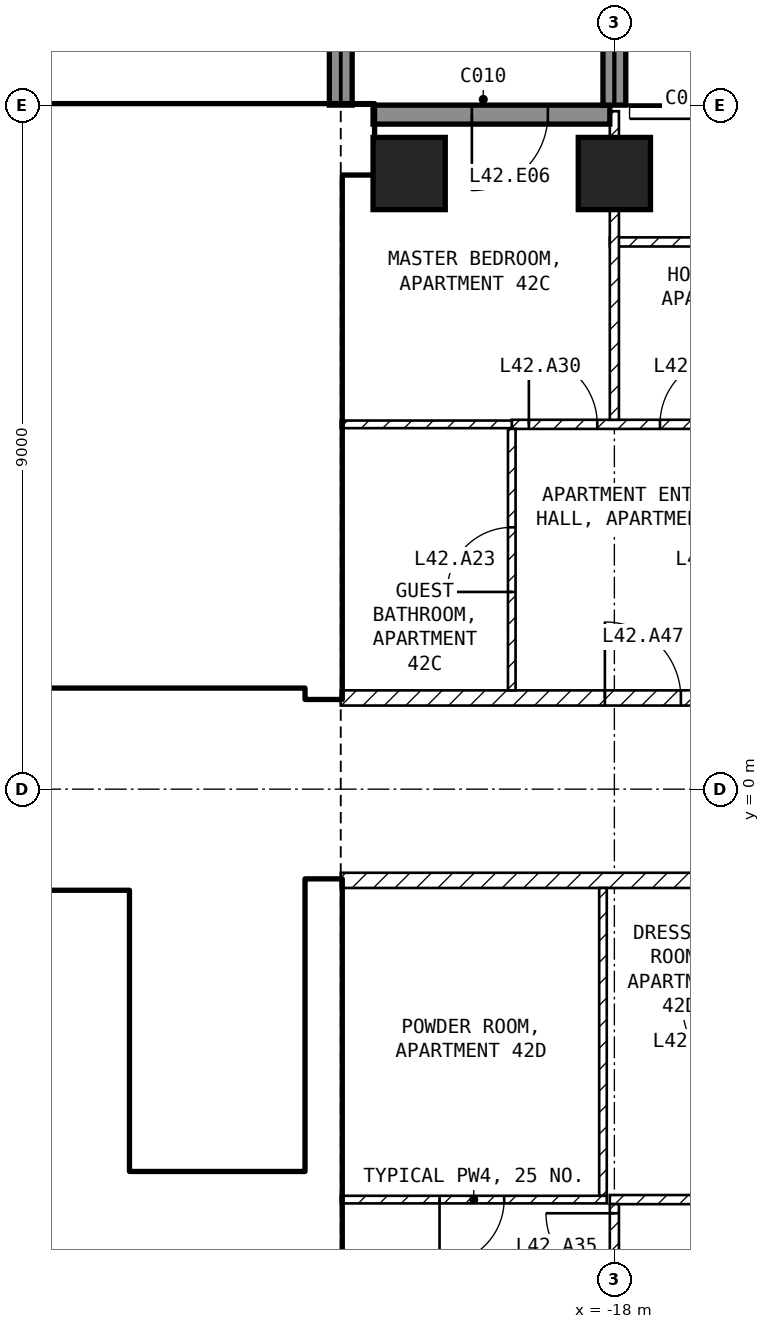
"""IFC4 building model, lengths in metres.
Left out: names, types, materials, properties, quantities, classifications, styles, units other than length and angle.
Written with IfcOpenShell. Run it as: python <this file> out.ifc"""

import sys

from ifc_helpers import new_model, si_unit, direction, frame, frame_2d, origin, origin_2d, place, context, subcontext, project, spatial, rectangle, extrude, element, fill, save


model = new_model("IFC4")
c1 = context("Model", 3, precision=1e-05, world=origin(), true_north=direction((0.0, 1.0)))
c2 = subcontext(c1, "Body", "Model", "MODEL_VIEW")
j1 = project(units=[si_unit("LENGTHUNIT", "METRE"), si_unit("PLANEANGLEUNIT", "RADIAN")], contexts=[c1])
p1 = place(None, origin())
s1 = spatial("IfcSite", under=j1, at=p1, CompositionType="ELEMENT")
p2 = place(p1, origin())
s2 = spatial("IfcBuilding", under=s1, at=p2, CompositionType="ELEMENT")
p3 = place(p2, frame((0.0, 0.0, 173.6)))
s3 = spatial("IfcBuildingStorey", under=s2, at=p3, CompositionType="ELEMENT", Elevation=173.6)
for number, where, z_axis, x_axis in (
    (1, (-20.7, 8.1, -0.25), (0.0, 0.0, 1.0), (1.0, 0.0, 0.0)),
    (2, (-18.0, 8.1, -0.25), (0.0, 0.0, 1.0), (1.0, 0.0, 0.0)),
):
    element("IfcColumn", number, at=place(p3, frame(where, z_axis=z_axis, x_axis=x_axis)), inside=s3, PredefinedType="COLUMN", context=c2, shape_type="SweptSolid", body=[
        extrude(rectangle(XDim=0.95, YDim=0.95, at=origin_2d()), origin(), (0.0, 0.0, 1.0), 3.5),
    ])
p4 = place(p3, frame((-18.06, 8.875, 0.0), z_axis=(0.0, 0.0, 1.0), x_axis=(-1.0, 0.0, 0.0)))
e3 = element("IfcWall", 3, at=p4, inside=s3, PredefinedType="SOLIDWALL", context=c2, shape_type="SweptSolid", body=[
    extrude(rectangle(XDim=3.115, YDim=0.25, at=frame_2d((1.558, 0.0))), origin(), (0.0, 0.0, 1.0), 3.25),
])
p5 = place(p4, frame((0.815, 0.0, 0.0)))
e4 = element("IfcOpeningElement", 4, at=p5, cuts=e3, PredefinedType="OPENING", context=c2, shape_type="SweptSolid", body=[
    extrude(rectangle(XDim=1.0, YDim=2.4, at=frame_2d((0.5, 1.2))), frame((0.0, 0.135, 0.0), z_axis=(0.0, -1.0, 0.0), x_axis=(1.0, 0.0, 0.0)), (0.0, 0.0, 1.0), 0.27),
])
for number, where, z_axis, x_axis in (
    (5, (-21.6, 9.0, 0.0), (0.0, 0.0, 1.0), (0.0, 1.0, 0.0)),
    (6, (-18.0, 9.0, 0.0), (0.0, 0.0, 1.0), (0.0, 1.0, 0.0)),
):
    element("IfcWall", number, at=place(p3, frame(where, z_axis=z_axis, x_axis=x_axis)), inside=s3, PredefinedType="SOLIDWALL", context=c2, shape_type="SweptSolid", body=[
        extrude(rectangle(XDim=2.7, YDim=0.3, at=frame_2d((1.35, 0.0))), origin(), (0.0, 0.0, 1.0), 3.25),
    ])
p6 = place(p3, frame((-29.6, 8.55, 0.0), z_axis=(0.0, 0.0, 1.0), x_axis=(1.0, 0.0, 0.0)))
e7 = element("IfcWall", 7, at=p6, inside=s3, PredefinedType="SHEAR", context=c2, shape_type="SweptSolid", body=[
    extrude(rectangle(XDim=8.425, YDim=0.9, at=frame_2d((4.212, 0.0))), origin(), (0.0, 0.0, 1.0), 3.25),
])
for number, where, z_axis, x_axis in (
    (8, (-21.825, -8.1, 0.0), (0.0, 0.0, 1.0), (0.0, 1.0, 0.0)),
    (9, (-21.825, 1.2, 0.0), (0.0, 0.0, 1.0), (0.0, 1.0, 0.0)),
):
    element("IfcWall", number, at=place(p3, frame(where, z_axis=z_axis, x_axis=x_axis)), inside=s3, PredefinedType="SHEAR", context=c2, shape_type="SweptSolid", body=[
        extrude(rectangle(XDim=6.9, YDim=0.45, at=frame_2d((3.45, 0.0))), origin(), (0.0, 0.0, 1.0), 3.25),
    ])
p7 = place(p3, frame((-33.2, 1.45, 0.0), z_axis=(0.0, 0.0, 1.0), x_axis=(1.0, 0.0, 0.0)))
e10 = element("IfcWall", 10, at=p7, inside=s3, PredefinedType="SOLIDWALL", context=c2, shape_type="SweptSolid", body=[
    extrude(rectangle(XDim=11.15, YDim=0.2, at=frame_2d((5.575, 0.0))), origin(), (0.0, 0.0, 1.0), 3.25),
])
p8 = place(p7, frame((9.4, 0.0, 0.0)))
e11 = element("IfcOpeningElement", 11, at=p8, cuts=e10, PredefinedType="OPENING", context=c2, shape_type="SweptSolid", body=[
    extrude(rectangle(XDim=1.0, YDim=2.1, at=frame_2d((0.5, 1.05))), frame((0.0, 0.11, 0.0), z_axis=(0.0, -1.0, 0.0), x_axis=(1.0, 0.0, 0.0)), (0.0, 0.0, 1.0), 0.22),
])
p9 = place(p7, frame((6.9, 0.0, 0.0)))
e12 = element("IfcOpeningElement", 12, at=p9, cuts=e10, PredefinedType="OPENING", context=c2, shape_type="SweptSolid", body=[
    extrude(rectangle(XDim=1.0, YDim=2.1, at=frame_2d((0.5, 1.05))), frame((0.0, 0.11, 0.0), z_axis=(0.0, -1.0, 0.0), x_axis=(1.0, 0.0, 0.0)), (0.0, 0.0, 1.0), 0.22),
])
p10 = place(p7, frame((1.1, 0.0, 0.0)))
e13 = element("IfcOpeningElement", 13, at=p10, cuts=e10, PredefinedType="OPENING", context=c2, shape_type="SweptSolid", body=[
    extrude(rectangle(XDim=0.9, YDim=2.1, at=frame_2d((0.45, 1.05))), frame((0.0, 0.11, 0.0), z_axis=(0.0, -1.0, 0.0), x_axis=(1.0, 0.0, 0.0)), (0.0, 0.0, 1.0), 0.22),
])
p11 = place(p3, frame((-24.5, -5.05, 0.0), z_axis=(0.0, 0.0, 1.0), x_axis=(0.0, 1.0, 0.0)))
e14 = element("IfcWall", 14, at=p11, inside=s3, PredefinedType="SOLIDWALL", context=c2, shape_type="SweptSolid", body=[
    extrude(rectangle(XDim=3.7, YDim=0.2, at=frame_2d((1.85, 0.0))), origin(), (0.0, 0.0, 1.0), 3.25),
])
p12 = place(p11, frame((0.1, 0.0, 0.0)))
e15 = element("IfcOpeningElement", 15, at=p12, cuts=e14, PredefinedType="OPENING", context=c2, shape_type="SweptSolid", body=[
    extrude(rectangle(XDim=0.8, YDim=2.1, at=frame_2d((0.4, 1.05))), frame((0.0, 0.11, 0.0), z_axis=(0.0, -1.0, 0.0), x_axis=(1.0, 0.0, 0.0)), (0.0, 0.0, 1.0), 0.22),
])
p13 = place(p3, frame((-28.35, 5.15, 0.0), z_axis=(0.0, 0.0, 1.0), x_axis=(1.0, 0.0, 0.0)))
e16 = element("IfcWall", 16, at=p13, inside=s3, PredefinedType="SOLIDWALL", context=c2, shape_type="SweptSolid", body=[
    extrude(rectangle(XDim=6.3, YDim=0.2, at=frame_2d((3.15, 0.0))), origin(), (0.0, 0.0, 1.0), 3.25),
])
p14 = place(p13, frame((5.1, 0.0, 0.0)))
e17 = element("IfcOpeningElement", 17, at=p14, cuts=e16, PredefinedType="OPENING", context=c2, shape_type="SweptSolid", body=[
    extrude(rectangle(XDim=1.0, YDim=2.1, at=frame_2d((0.5, 1.05))), frame((0.0, 0.11, 0.0), z_axis=(0.0, -1.0, 0.0), x_axis=(1.0, 0.0, 0.0)), (0.0, 0.0, 1.0), 0.22),
])
p15 = place(p3, frame((-28.35, -5.15, 0.0), z_axis=(0.0, 0.0, 1.0), x_axis=(1.0, 0.0, 0.0)))
e18 = element("IfcWall", 18, at=p15, inside=s3, PredefinedType="SOLIDWALL", context=c2, shape_type="SweptSolid", body=[
    extrude(rectangle(XDim=6.3, YDim=0.2, at=frame_2d((3.15, 0.0))), origin(), (0.0, 0.0, 1.0), 3.25),
])
p16 = place(p15, frame((5.1, 0.0, 0.0)))
e19 = element("IfcOpeningElement", 19, at=p16, cuts=e18, PredefinedType="OPENING", context=c2, shape_type="SweptSolid", body=[
    extrude(rectangle(XDim=1.0, YDim=2.1, at=frame_2d((0.5, 1.05))), frame((0.0, 0.11, 0.0), z_axis=(0.0, -1.0, 0.0), x_axis=(1.0, 0.0, 0.0)), (0.0, 0.0, 1.0), 0.22),
])
p17 = place(p3, frame((-33.2, -1.45, 0.0), z_axis=(0.0, 0.0, 1.0), x_axis=(1.0, 0.0, 0.0)))
e20 = element("IfcWall", 20, at=p17, inside=s3, PredefinedType="SOLIDWALL", context=c2, shape_type="SweptSolid", body=[
    extrude(rectangle(XDim=8.6, YDim=0.2, at=frame_2d((4.3, 0.0))), origin(), (0.0, 0.0, 1.0), 3.25),
])
p18 = place(p17, frame((7.2, 0.0, 0.0)))
e21 = element("IfcOpeningElement", 21, at=p18, cuts=e20, PredefinedType="OPENING", context=c2, shape_type="SweptSolid", body=[
    extrude(rectangle(XDim=1.0, YDim=2.1, at=frame_2d((0.5, 1.05))), frame((0.0, 0.11, 0.0), z_axis=(0.0, -1.0, 0.0), x_axis=(1.0, 0.0, 0.0)), (0.0, 0.0, 1.0), 0.22),
])
p19 = place(p17, frame((5.2, 0.0, 0.0)))
e22 = element("IfcOpeningElement", 22, at=p19, cuts=e20, PredefinedType="OPENING", context=c2, shape_type="SweptSolid", body=[
    extrude(rectangle(XDim=1.0, YDim=2.1, at=frame_2d((0.5, 1.05))), frame((0.0, 0.11, 0.0), z_axis=(0.0, -1.0, 0.0), x_axis=(1.0, 0.0, 0.0)), (0.0, 0.0, 1.0), 0.22),
])
p20 = place(p17, frame((3.2, 0.0, 0.0)))
e23 = element("IfcOpeningElement", 23, at=p20, cuts=e20, PredefinedType="OPENING", context=c2, shape_type="SweptSolid", body=[
    extrude(rectangle(XDim=1.0, YDim=2.1, at=frame_2d((0.5, 1.05))), frame((0.0, 0.11, 0.0), z_axis=(0.0, -1.0, 0.0), x_axis=(1.0, 0.0, 0.0)), (0.0, 0.0, 1.0), 0.22),
])
p21 = place(p17, frame((0.85, 0.0, 0.0)))
e24 = element("IfcOpeningElement", 24, at=p21, cuts=e20, PredefinedType="OPENING", context=c2, shape_type="SweptSolid", body=[
    extrude(rectangle(XDim=0.9, YDim=2.1, at=frame_2d((0.45, 1.05))), frame((0.0, 0.11, 0.0), z_axis=(0.0, -1.0, 0.0), x_axis=(1.0, 0.0, 0.0)), (0.0, 0.0, 1.0), 0.22),
])
p22 = place(p3, frame((-33.2, -3.95, 0.0), z_axis=(0.0, 0.0, 1.0), x_axis=(1.0, 0.0, 0.0)))
e25 = element("IfcWall", 25, at=p22, inside=s3, PredefinedType="SOLIDWALL", context=c2, shape_type="SweptSolid", body=[
    extrude(rectangle(XDim=8.6, YDim=0.2, at=frame_2d((4.3, 0.0))), origin(), (0.0, 0.0, 1.0), 3.25),
])
p23 = place(p3, frame((-21.6, 1.2, 0.0), z_axis=(0.0, 0.0, 1.0), x_axis=(1.0, 0.0, 0.0)))
e26 = element("IfcWall", 26, at=p23, inside=s3, PredefinedType="PARTITIONING", context=c2, shape_type="SweptSolid", body=[
    extrude(rectangle(XDim=17.2, YDim=0.2, at=frame_2d((8.6, 0.0))), origin(), (0.0, 0.0, 1.0), 3.25),
])
p24 = place(p23, frame((3.475, 0.0, 0.0)))
e27 = element("IfcOpeningElement", 27, at=p24, cuts=e26, PredefinedType="OPENING", context=c2, shape_type="SweptSolid", body=[
    extrude(rectangle(XDim=1.0, YDim=2.1, at=frame_2d((0.5, 1.05))), frame((0.0, 0.11, 0.0), z_axis=(0.0, -1.0, 0.0), x_axis=(1.0, 0.0, 0.0)), (0.0, 0.0, 1.0), 0.22),
])
p25 = place(p3, frame((-4.4, -1.2, 0.0), z_axis=(0.0, 0.0, 1.0), x_axis=(-1.0, 0.0, 0.0)))
e28 = element("IfcWall", 28, at=p25, inside=s3, PredefinedType="PARTITIONING", context=c2, shape_type="SweptSolid", body=[
    extrude(rectangle(XDim=17.2, YDim=0.2, at=frame_2d((8.6, 0.0))), origin(), (0.0, 0.0, 1.0), 3.25),
])
p26 = place(p25, frame((9.95, 0.0, 0.0)))
e29 = element("IfcOpeningElement", 29, at=p26, cuts=e28, PredefinedType="OPENING", context=c2, shape_type="SweptSolid", body=[
    extrude(rectangle(XDim=1.0, YDim=2.1, at=frame_2d((0.5, 1.05))), frame((0.0, 0.11, 0.0), z_axis=(0.0, -1.0, 0.0), x_axis=(1.0, 0.0, 0.0)), (0.0, 0.0, 1.0), 0.22),
])
p27 = place(p3, frame((-19.35, 4.8, 0.0), z_axis=(0.0, 0.0, 1.0), x_axis=(1.0, 0.0, 0.0)))
e30 = element("IfcWall", 30, at=p27, inside=s3, PredefinedType="PARTITIONING", context=c2, shape_type="SweptSolid", body=[
    extrude(rectangle(XDim=10.41, YDim=0.12, at=frame_2d((5.205, 0.0))), origin(), (0.0, 0.0, 1.0), 3.25),
])
p28 = place(p27, frame((1.95, 0.0, 0.0)))
e31 = element("IfcOpeningElement", 31, at=p28, cuts=e30, PredefinedType="OPENING", context=c2, shape_type="SweptSolid", body=[
    extrude(rectangle(XDim=0.9, YDim=2.1, at=frame_2d((0.45, 1.05))), frame((0.0, 0.07, 0.0), z_axis=(0.0, -1.0, 0.0), x_axis=(1.0, 0.0, 0.0)), (0.0, 0.0, 1.0), 0.14),
])
p29 = place(p27, frame((7.8, 0.0, 0.0)))
e32 = element("IfcOpeningElement", 32, at=p29, cuts=e30, PredefinedType="OPENING", context=c2, shape_type="SweptSolid", body=[
    extrude(rectangle(XDim=0.9, YDim=2.1, at=frame_2d((0.45, 1.05))), frame((0.0, 0.07, 0.0), z_axis=(0.0, -1.0, 0.0), x_axis=(1.0, 0.0, 0.0)), (0.0, 0.0, 1.0), 0.14),
])
p30 = place(p27, frame((0.225, 0.0, 0.0)))
e33 = element("IfcOpeningElement", 33, at=p30, cuts=e30, PredefinedType="OPENING", context=c2, shape_type="SweptSolid", body=[
    extrude(rectangle(XDim=0.9, YDim=2.1, at=frame_2d((0.45, 1.05))), frame((0.0, 0.07, 0.0), z_axis=(0.0, -1.0, 0.0), x_axis=(1.0, 0.0, 0.0)), (0.0, 0.0, 1.0), 0.14),
])
p31 = place(p3, frame((-19.35, 1.3, 0.0), z_axis=(0.0, 0.0, 1.0), x_axis=(0.0, 1.0, 0.0)))
e34 = element("IfcWall", 34, at=p31, inside=s3, PredefinedType="PARTITIONING", context=c2, shape_type="SweptSolid", body=[
    extrude(rectangle(XDim=3.44, YDim=0.1, at=frame_2d((1.72, 0.0))), origin(), (0.0, 0.0, 1.0), 3.25),
])
p32 = place(p31, frame((1.295, 0.0, 0.0)))
e35 = element("IfcOpeningElement", 35, at=p32, cuts=e34, PredefinedType="OPENING", context=c2, shape_type="SweptSolid", body=[
    extrude(rectangle(XDim=0.85, YDim=2.1, at=frame_2d((0.425, 1.05))), frame((0.0, 0.06, 0.0), z_axis=(0.0, -1.0, 0.0), x_axis=(1.0, 0.0, 0.0)), (0.0, 0.0, 1.0), 0.12),
])
p33 = place(p3, frame((-21.6, 4.8, 0.0), z_axis=(0.0, 0.0, 1.0), x_axis=(1.0, 0.0, 0.0)))
e36 = element("IfcWall", 36, at=p33, inside=s3, PredefinedType="PARTITIONING", context=c2, shape_type="SweptSolid", body=[
    extrude(rectangle(XDim=2.25, YDim=0.1, at=frame_2d((1.125, 0.0))), origin(), (0.0, 0.0, 1.0), 3.25),
])
p34 = place(p3, frame((-14.64, 7.2, 0.0), z_axis=(0.0, 0.0, 1.0), x_axis=(-1.0, 0.0, 0.0)))
e37 = element("IfcWall", 37, at=p34, inside=s3, PredefinedType="PARTITIONING", context=c2, shape_type="SweptSolid", body=[
    extrude(rectangle(XDim=3.42, YDim=0.12, at=frame_2d((1.71, 0.0))), origin(), (0.0, 0.0, 1.0), 3.25),
])
p35 = place(p3, frame((-18.0, 4.86, 0.0), z_axis=(0.0, 0.0, 1.0), x_axis=(0.0, 1.0, 0.0)))
e38 = element("IfcWall", 38, at=p35, inside=s3, PredefinedType="PARTITIONING", context=c2, shape_type="SweptSolid", body=[
    extrude(rectangle(XDim=4.06, YDim=0.12, at=frame_2d((2.03, 0.0))), origin(), (0.0, 0.0, 1.0), 2.48),
])
p36 = place(p3, frame((-8.94, -5.4, 0.0), z_axis=(0.0, 0.0, 1.0), x_axis=(-1.0, 0.0, 0.0)))
e39 = element("IfcWall", 39, at=p36, inside=s3, PredefinedType="PARTITIONING", context=c2, shape_type="SweptSolid", body=[
    extrude(rectangle(XDim=9.12, YDim=0.12, at=frame_2d((4.56, 0.0))), origin(), (0.0, 0.0, 1.0), 3.25),
])
p37 = place(p36, frame((5.46, 0.0, 0.0)))
e40 = element("IfcOpeningElement", 40, at=p37, cuts=e39, PredefinedType="OPENING", context=c2, shape_type="SweptSolid", body=[
    extrude(rectangle(XDim=0.9, YDim=2.1, at=frame_2d((0.45, 1.05))), frame((0.0, 0.07, 0.0), z_axis=(0.0, -1.0, 0.0), x_axis=(1.0, 0.0, 0.0)), (0.0, 0.0, 1.0), 0.14),
])
p38 = place(p3, frame((-18.15, -5.35, 0.0), z_axis=(0.0, 0.0, 1.0), x_axis=(0.0, 1.0, 0.0)))
e41 = element("IfcWall", 41, at=p38, inside=s3, PredefinedType="PARTITIONING", context=c2, shape_type="SweptSolid", body=[
    extrude(rectangle(XDim=4.05, YDim=0.1, at=frame_2d((2.025, 0.0))), origin(), (0.0, 0.0, 1.0), 2.48),
])
p39 = place(p3, frame((-18.1, -5.4, 0.0), z_axis=(0.0, 0.0, 1.0), x_axis=(-1.0, 0.0, 0.0)))
e42 = element("IfcWall", 42, at=p39, inside=s3, PredefinedType="PARTITIONING", context=c2, shape_type="SweptSolid", body=[
    extrude(rectangle(XDim=3.5, YDim=0.1, at=frame_2d((1.75, 0.0))), origin(), (0.0, 0.0, 1.0), 3.25),
])
p40 = place(p39, frame((1.35, 0.0, 0.0)))
e43 = element("IfcOpeningElement", 43, at=p40, cuts=e42, PredefinedType="OPENING", context=c2, shape_type="SweptSolid", body=[
    extrude(rectangle(XDim=0.85, YDim=2.1, at=frame_2d((0.425, 1.05))), frame((0.0, 0.06, 0.0), z_axis=(0.0, -1.0, 0.0), x_axis=(1.0, 0.0, 0.0)), (0.0, 0.0, 1.0), 0.12),
])
p41 = place(p3, frame((-18.0, -8.92, 0.0), z_axis=(0.0, 0.0, 1.0), x_axis=(0.0, 1.0, 0.0)))
e44 = element("IfcWall", 44, at=p41, inside=s3, PredefinedType="PARTITIONING", context=c2, shape_type="SweptSolid", body=[
    extrude(rectangle(XDim=3.46, YDim=0.12, at=frame_2d((1.73, 0.0))), origin(), (0.0, 0.0, 1.0), 2.48),
])
p42 = place(p41, frame((2.44, 0.0, 0.0)))
e45 = element("IfcOpeningElement", 45, at=p42, cuts=e44, PredefinedType="OPENING", context=c2, shape_type="SweptSolid", body=[
    extrude(rectangle(XDim=0.9, YDim=2.1, at=frame_2d((0.45, 1.05))), frame((0.0, 0.07, 0.0), z_axis=(0.0, -1.0, 0.0), x_axis=(1.0, 0.0, 0.0)), (0.0, 0.0, 1.0), 0.14),
])
p43 = place(p5, origin())
e46 = element("IfcDoor", 46, at=p43, inside=s3, OperationType="SINGLE_SWING_RIGHT", PredefinedType="DOOR", context=c2, shape_type="SweptSolid", body=[
    extrude(rectangle(XDim=1.0, YDim=2.4, at=frame_2d((0.5, 1.2))), frame((0.0, 0.025, 0.0), z_axis=(0.0, -1.0, 0.0), x_axis=(1.0, 0.0, 0.0)), (0.0, 0.0, 1.0), 0.05),
])
fill(e4, e46)
p44 = place(p18, origin())
e47 = element("IfcDoor", 47, at=p44, inside=s3, OperationType="DOUBLE_DOOR_SLIDING", PredefinedType="DOOR", context=c2, shape_type="SweptSolid", body=[
    extrude(rectangle(XDim=1.0, YDim=2.1, at=frame_2d((0.5, 1.05))), frame((0.0, 0.025, 0.0), z_axis=(0.0, -1.0, 0.0), x_axis=(1.0, 0.0, 0.0)), (0.0, 0.0, 1.0), 0.05),
])
fill(e21, e47)
p45 = place(p16, origin())
e48 = element("IfcDoor", 48, at=p45, inside=s3, OperationType="SINGLE_SWING_LEFT", PredefinedType="DOOR", context=c2, shape_type="SweptSolid", body=[
    extrude(rectangle(XDim=1.0, YDim=2.1, at=frame_2d((0.5, 1.05))), frame((0.0, 0.025, 0.0), z_axis=(0.0, -1.0, 0.0), x_axis=(1.0, 0.0, 0.0)), (0.0, 0.0, 1.0), 0.05),
])
fill(e19, e48)
p46 = place(p14, origin())
e49 = element("IfcDoor", 49, at=p46, inside=s3, OperationType="SINGLE_SWING_LEFT", PredefinedType="DOOR", context=c2, shape_type="SweptSolid", body=[
    extrude(rectangle(XDim=1.0, YDim=2.1, at=frame_2d((0.5, 1.05))), frame((0.0, 0.025, 0.0), z_axis=(0.0, -1.0, 0.0), x_axis=(1.0, 0.0, 0.0)), (0.0, 0.0, 1.0), 0.05),
])
fill(e17, e49)
p47 = place(p8, origin())
e50 = element("IfcDoor", 50, at=p47, inside=s3, OperationType="SINGLE_SWING_LEFT", PredefinedType="DOOR", context=c2, shape_type="SweptSolid", body=[
    extrude(rectangle(XDim=1.0, YDim=2.1, at=frame_2d((0.5, 1.05))), frame((0.0, 0.025, 0.0), z_axis=(0.0, -1.0, 0.0), x_axis=(1.0, 0.0, 0.0)), (0.0, 0.0, 1.0), 0.05),
])
fill(e11, e50)
p48 = place(p12, origin())
e51 = element("IfcDoor", 51, at=p48, inside=s3, OperationType="SINGLE_SWING_LEFT", PredefinedType="DOOR", context=c2, shape_type="SweptSolid", body=[
    extrude(rectangle(XDim=0.8, YDim=2.1, at=frame_2d((0.4, 1.05))), frame((0.0, 0.025, 0.0), z_axis=(0.0, -1.0, 0.0), x_axis=(1.0, 0.0, 0.0)), (0.0, 0.0, 1.0), 0.05),
])
fill(e15, e51)
p49 = place(p9, origin())
e52 = element("IfcDoor", 52, at=p49, inside=s3, OperationType="SINGLE_SWING_LEFT", PredefinedType="DOOR", context=c2, shape_type="SweptSolid", body=[
    extrude(rectangle(XDim=1.0, YDim=2.1, at=frame_2d((0.5, 1.05))), frame((0.0, 0.025, 0.0), z_axis=(0.0, -1.0, 0.0), x_axis=(1.0, 0.0, 0.0)), (0.0, 0.0, 1.0), 0.05),
])
fill(e12, e52)
p50 = place(p32, origin())
e53 = element("IfcDoor", 53, at=p50, inside=s3, OperationType="SINGLE_SWING_LEFT", PredefinedType="DOOR", context=c2, shape_type="SweptSolid", body=[
    extrude(rectangle(XDim=0.85, YDim=2.1, at=frame_2d((0.425, 1.05))), frame((0.0, 0.025, 0.0), z_axis=(0.0, -1.0, 0.0), x_axis=(1.0, 0.0, 0.0)), (0.0, 0.0, 1.0), 0.05),
])
fill(e35, e53)
p51 = place(p28, origin())
e54 = element("IfcDoor", 54, at=p51, inside=s3, OperationType="SINGLE_SWING_RIGHT", PredefinedType="DOOR", context=c2, shape_type="SweptSolid", body=[
    extrude(rectangle(XDim=0.9, YDim=2.1, at=frame_2d((0.45, 1.05))), frame((0.0, 0.025, 0.0), z_axis=(0.0, -1.0, 0.0), x_axis=(1.0, 0.0, 0.0)), (0.0, 0.0, 1.0), 0.05),
])
fill(e31, e54)
p52 = place(p30, origin())
e55 = element("IfcDoor", 55, at=p52, inside=s3, OperationType="SINGLE_SWING_LEFT", PredefinedType="DOOR", context=c2, shape_type="SweptSolid", body=[
    extrude(rectangle(XDim=0.9, YDim=2.1, at=frame_2d((0.45, 1.05))), frame((0.0, 0.025, 0.0), z_axis=(0.0, -1.0, 0.0), x_axis=(1.0, 0.0, 0.0)), (0.0, 0.0, 1.0), 0.05),
])
fill(e33, e55)
p53 = place(p42, origin())
e56 = element("IfcDoor", 56, at=p53, inside=s3, OperationType="SINGLE_SWING_RIGHT", PredefinedType="DOOR", context=c2, shape_type="SweptSolid", body=[
    extrude(rectangle(XDim=0.9, YDim=2.1, at=frame_2d((0.45, 1.05))), frame((0.0, 0.025, 0.0), z_axis=(0.0, -1.0, 0.0), x_axis=(1.0, 0.0, 0.0)), (0.0, 0.0, 1.0), 0.05),
])
fill(e45, e56)
p54 = place(p40, origin())
e57 = element("IfcDoor", 57, at=p54, inside=s3, OperationType="SINGLE_SWING_RIGHT", PredefinedType="DOOR", context=c2, shape_type="SweptSolid", body=[
    extrude(rectangle(XDim=0.85, YDim=2.1, at=frame_2d((0.425, 1.05))), frame((0.0, 0.025, 0.0), z_axis=(0.0, -1.0, 0.0), x_axis=(1.0, 0.0, 0.0)), (0.0, 0.0, 1.0), 0.05),
])
fill(e43, e57)
p55 = place(p24, origin())
e58 = element("IfcDoor", 58, at=p55, inside=s3, OperationType="SINGLE_SWING_LEFT", PredefinedType="DOOR", context=c2, shape_type="SweptSolid", body=[
    extrude(rectangle(XDim=1.0, YDim=2.1, at=frame_2d((0.5, 1.05))), frame((0.0, 0.025, 0.0), z_axis=(0.0, -1.0, 0.0), x_axis=(1.0, 0.0, 0.0)), (0.0, 0.0, 1.0), 0.05),
])
fill(e27, e58)
save(model, sys.argv[1])
